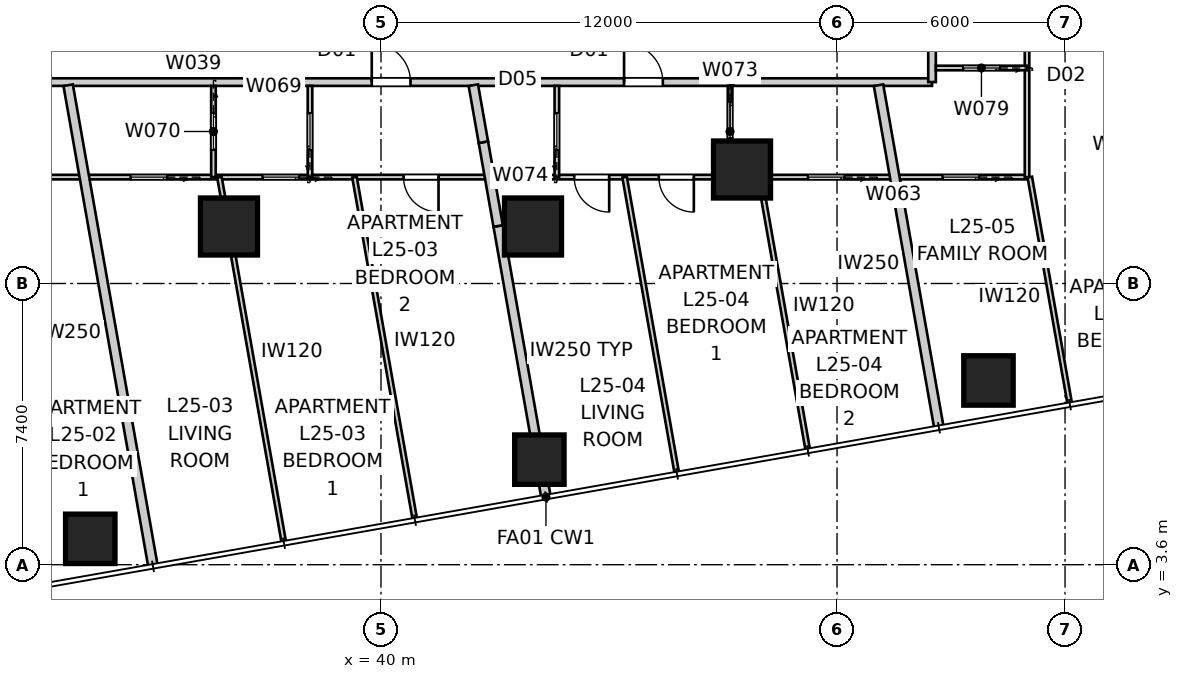
"""IFC4 building model, lengths in metres.
Left out: names, types, materials, properties, quantities, classifications, styles, units other than length and angle.
Written with IfcOpenShell. Run it as: python <this file> out.ifc"""

import sys

from ifc_helpers import new_model, si_unit, direction, frame, frame_2d, origin, origin_2d, place, context, subcontext, project, spatial, rectangle, extrude, element, fill, save


model = new_model("IFC4")
c1 = context("Model", 3, precision=1e-05, world=origin(), true_north=direction((0.0, 1.0)))
c2 = subcontext(c1, "Body", "Model", "MODEL_VIEW")
j1 = project(units=[si_unit("LENGTHUNIT", "METRE"), si_unit("PLANEANGLEUNIT", "RADIAN")], contexts=[c1])
p1 = place(None, origin())
s1 = spatial("IfcSite", under=j1, at=p1, CompositionType="ELEMENT")
p2 = place(p1, origin())
s2 = spatial("IfcBuilding", under=s1, at=p2, CompositionType="ELEMENT")
p3 = place(p2, frame((0.0, 0.0, 93.0)))
s3 = spatial("IfcBuildingStorey", under=s2, at=p3, CompositionType="ELEMENT", Elevation=93.0)
for number, where, z_axis, x_axis in (
    (1, (32.35, 4.281, 0.0), (0.0, 0.0, 1.0), (1.0, 0.0, 0.0)),
    (2, (44.167, 6.365, 0.0), (0.0, 0.0, 1.0), (1.0, 0.0, 0.0)),
    (3, (55.985, 8.448, 0.0), (0.0, 0.0, 1.0), (1.0, 0.0, 0.0)),
):
    element("IfcColumn", number, at=place(p3, frame(where, z_axis=z_axis, x_axis=x_axis)), inside=s3, PredefinedType="COLUMN", context=c2, shape_type="SweptSolid", body=[
        extrude(rectangle(XDim=1.3, YDim=1.3, at=origin_2d()), origin(), (0.0, 0.0, 1.0), 3.4),
    ])
for number, where, z_axis, x_axis in (
    (4, (36.0, 12.5, 0.0), (0.0, 0.0, 1.0), (1.0, 0.0, 0.0)),
    (5, (44.0, 12.5, 0.0), (0.0, 0.0, 1.0), (1.0, 0.0, 0.0)),
    (6, (49.5, 14.0, 0.0), (0.0, 0.0, 1.0), (1.0, 0.0, 0.0)),
):
    element("IfcColumn", number, at=place(p3, frame(where, z_axis=z_axis, x_axis=x_axis)), inside=s3, PredefinedType="COLUMN", context=c2, shape_type="SweptSolid", body=[
        extrude(rectangle(XDim=1.5, YDim=1.5, at=origin_2d()), origin(), (0.0, 0.0, 1.0), 3.4),
    ])
p4 = place(p3, frame((25.5, 16.3, 0.0), z_axis=(0.0, 0.0, 1.0), x_axis=(1.0, 0.0, 0.0)))
e7 = element("IfcWall", 7, at=p4, inside=s3, PredefinedType="PARTITIONING", context=c2, shape_type="SweptSolid", body=[
    extrude(rectangle(XDim=29.0, YDim=0.2, at=frame_2d((14.5, 0.0))), origin(), (0.0, 0.0, 1.0), 3.25),
])
p5 = place(p4, frame((20.896, 0.0, 0.0)))
e8 = element("IfcOpeningElement", 8, at=p5, cuts=e7, PredefinedType="OPENING", context=c2, shape_type="SweptSolid", body=[
    extrude(rectangle(XDim=1.02, YDim=2.34, at=frame_2d((0.51, 1.17))), frame((0.0, 0.11, 0.0), z_axis=(0.0, -1.0, 0.0), x_axis=(1.0, 0.0, 0.0)), (0.0, 0.0, 1.0), 0.22),
])
p6 = place(p4, frame((14.257, 0.0, 0.0)))
e9 = element("IfcOpeningElement", 9, at=p6, cuts=e7, PredefinedType="OPENING", context=c2, shape_type="SweptSolid", body=[
    extrude(rectangle(XDim=1.02, YDim=2.34, at=frame_2d((0.51, 1.17))), frame((0.0, 0.11, 0.0), z_axis=(0.0, -1.0, 0.0), x_axis=(1.0, 0.0, 0.0)), (0.0, 0.0, 1.0), 0.22),
])
p7 = place(p4, frame((3.857, 0.0, 0.0)))
e10 = element("IfcOpeningElement", 10, at=p7, cuts=e7, PredefinedType="OPENING", context=c2, shape_type="SweptSolid", body=[
    extrude(rectangle(XDim=1.02, YDim=2.34, at=frame_2d((0.51, 1.17))), frame((0.0, 0.11, 0.0), z_axis=(0.0, -1.0, 0.0), x_axis=(1.0, 0.0, 0.0)), (0.0, 0.0, 1.0), 0.22),
])
p8 = place(p3, frame((54.5, 16.3, 0.0), z_axis=(0.0, 0.0, 1.0), x_axis=(0.0, 1.0, 0.0)))
e11 = element("IfcWall", 11, at=p8, inside=s3, PredefinedType="PARTITIONING", context=c2, shape_type="SweptSolid", body=[
    extrude(rectangle(XDim=27.4, YDim=0.2, at=frame_2d((13.7, 0.0))), origin(), (0.0, 0.0, 1.0), 3.25),
])
p9 = place(p8, frame((19.308, 0.0, 0.0)))
e12 = element("IfcOpeningElement", 12, at=p9, cuts=e11, PredefinedType="OPENING", context=c2, shape_type="SweptSolid", body=[
    extrude(rectangle(XDim=1.02, YDim=2.34, at=frame_2d((0.51, 1.17))), frame((0.0, 0.11, 0.0), z_axis=(0.0, -1.0, 0.0), x_axis=(1.0, 0.0, 0.0)), (0.0, 0.0, 1.0), 0.22),
])
p10 = place(p8, frame((24.687, 0.0, 0.0)))
e13 = element("IfcOpeningElement", 13, at=p10, cuts=e11, PredefinedType="OPENING", context=c2, shape_type="SweptSolid", body=[
    extrude(rectangle(XDim=1.02, YDim=2.1, at=frame_2d((0.51, 1.05))), frame((0.0, 0.11, 0.0), z_axis=(0.0, -1.0, 0.0), x_axis=(1.0, 0.0, 0.0)), (0.0, 0.0, 1.0), 0.22),
])
p11 = place(p8, frame((1.622, 0.0, 0.0)))
e14 = element("IfcOpeningElement", 14, at=p11, cuts=e11, PredefinedType="OPENING", context=c2, shape_type="SweptSolid", body=[
    extrude(rectangle(XDim=1.02, YDim=2.1, at=frame_2d((0.51, 1.05))), frame((0.0, 0.11, 0.0), z_axis=(0.0, -1.0, 0.0), x_axis=(1.0, 0.0, 0.0)), (0.0, 0.0, 1.0), 0.22),
])
p12 = place(p3, frame((44.341, 5.38, 0.0), z_axis=(0.0, 0.0, 1.0), x_axis=(-0.173677660443, 0.984802553948, 0.0)))
e15 = element("IfcWall", 15, at=p12, inside=s3, PredefinedType="PARTITIONING", context=c2, shape_type="SweptSolid", body=[
    extrude(rectangle(XDim=7.244, YDim=0.25, at=frame_2d((3.622, 0.0))), origin(), (0.0, 0.0, 1.0), 3.25),
])
p13 = place(p3, frame((43.083, 12.513, 0.0), z_axis=(0.0, 0.0, 1.0), x_axis=(-0.17363609779, 0.984809882944, 0.0)))
e16 = element("IfcWall", 16, at=p13, inside=s3, PredefinedType="PARTITIONING", context=c2, shape_type="SweptSolid", body=[
    extrude(rectangle(XDim=2.24, YDim=0.25, at=frame_2d((1.12, 0.0))), origin(), (0.0, 0.0, 1.0), 2.795),
])
p14 = place(p3, frame((42.694, 14.719, 0.0), z_axis=(0.0, 0.0, 1.0), x_axis=(-0.173602272028, 0.984815846312, 0.0)))
e17 = element("IfcWall", 17, at=p14, inside=s3, PredefinedType="PARTITIONING", context=c2, shape_type="SweptSolid", body=[
    extrude(rectangle(XDim=1.522, YDim=0.25, at=frame_2d((0.761, 0.0))), origin(), (0.0, 0.0, 1.0), 3.25),
])
p15 = place(p3, frame((34.001, 3.556, 0.0), z_axis=(0.0, 0.0, 1.0), x_axis=(-0.173639088111, 0.984809355703, 0.0)))
e18 = element("IfcWall", 18, at=p15, inside=s3, PredefinedType="PARTITIONING", context=c2, shape_type="SweptSolid", body=[
    extrude(rectangle(XDim=12.857, YDim=0.25, at=frame_2d((6.428, 0.0))), origin(), (0.0, 0.0, 1.0), 3.25),
])
p16 = place(p3, frame((54.682, 7.203, 0.0), z_axis=(0.0, 0.0, 1.0), x_axis=(-0.173630137029, 0.984810933893, 0.0)))
e19 = element("IfcWall", 19, at=p16, inside=s3, PredefinedType="PARTITIONING", context=c2, shape_type="SweptSolid", body=[
    extrude(rectangle(XDim=9.154, YDim=0.25, at=frame_2d((4.577, 0.0))), origin(), (0.0, 0.0, 1.0), 3.25),
])
p17 = place(p3, frame((57.0, 13.8, 0.0), z_axis=(0.0, 0.0, 1.0), x_axis=(-1.0, 0.0, 0.0)))
e20 = element("IfcWall", 20, at=p17, inside=s3, PredefinedType="PARTITIONING", context=c2, shape_type="SweptSolid", body=[
    extrude(rectangle(XDim=34.0, YDim=0.12, at=frame_2d((17.0, 0.0))), origin(), (0.0, 0.0, 1.0), 2.55),
])
p18 = place(p17, frame((8.768, 0.0, 0.0)))
e21 = element("IfcOpeningElement", 21, at=p18, cuts=e20, PredefinedType="OPENING", context=c2, shape_type="SweptSolid", body=[
    extrude(rectangle(XDim=0.92, YDim=2.34, at=frame_2d((0.46, 1.17))), frame((0.0, 0.07, 0.0), z_axis=(0.0, -1.0, 0.0), x_axis=(1.0, 0.0, 0.0)), (0.0, 0.0, 1.0), 0.14),
])
p19 = place(p17, frame((10.995, 0.0, 0.0)))
e22 = element("IfcOpeningElement", 22, at=p19, cuts=e20, PredefinedType="OPENING", context=c2, shape_type="SweptSolid", body=[
    extrude(rectangle(XDim=0.92, YDim=2.34, at=frame_2d((0.46, 1.17))), frame((0.0, 0.07, 0.0), z_axis=(0.0, -1.0, 0.0), x_axis=(1.0, 0.0, 0.0)), (0.0, 0.0, 1.0), 0.14),
])
p20 = place(p17, frame((15.486, 0.0, 0.0)))
e23 = element("IfcOpeningElement", 23, at=p20, cuts=e20, PredefinedType="OPENING", context=c2, shape_type="SweptSolid", body=[
    extrude(rectangle(XDim=0.92, YDim=2.34, at=frame_2d((0.46, 1.17))), frame((0.0, 0.07, 0.0), z_axis=(0.0, -1.0, 0.0), x_axis=(1.0, 0.0, 0.0)), (0.0, 0.0, 1.0), 0.14),
])
p21 = place(p17, frame((4.804, 0.0, 0.0)))
e24 = element("IfcOpeningElement", 24, at=p21, cuts=e20, PredefinedType="OPENING", context=c2, shape_type="SweptSolid", body=[
    extrude(rectangle(XDim=0.96, YDim=2.1, at=frame_2d((0.48, 1.05))), frame((0.0, 0.07, 0.0), z_axis=(0.0, -1.0, 0.0), x_axis=(1.0, 0.0, 0.0)), (0.0, 0.0, 1.0), 0.14),
])
p22 = place(p17, frame((19.155, 0.0, 0.0)))
e25 = element("IfcOpeningElement", 25, at=p22, cuts=e20, PredefinedType="OPENING", context=c2, shape_type="SweptSolid", body=[
    extrude(rectangle(XDim=0.96, YDim=2.1, at=frame_2d((0.48, 1.05))), frame((0.0, 0.07, 0.0), z_axis=(0.0, -1.0, 0.0), x_axis=(1.0, 0.0, 0.0)), (0.0, 0.0, 1.0), 0.14),
])
p23 = place(p17, frame((31.473, 0.0, 0.0)))
e26 = element("IfcOpeningElement", 26, at=p23, cuts=e20, PredefinedType="OPENING", context=c2, shape_type="SweptSolid", body=[
    extrude(rectangle(XDim=0.96, YDim=2.1, at=frame_2d((0.48, 1.05))), frame((0.0, 0.07, 0.0), z_axis=(0.0, -1.0, 0.0), x_axis=(1.0, 0.0, 0.0)), (0.0, 0.0, 1.0), 0.14),
])
p24 = place(p17, frame((1.261, 0.0, 0.0)))
e27 = element("IfcOpeningElement", 27, at=p24, cuts=e20, PredefinedType="OPENING", context=c2, shape_type="SweptSolid", body=[
    extrude(rectangle(XDim=0.96, YDim=2.1, at=frame_2d((0.48, 1.05))), frame((0.0, 0.07, 0.0), z_axis=(0.0, -1.0, 0.0), x_axis=(1.0, 0.0, 0.0)), (0.0, 0.0, 1.0), 0.14),
])
p25 = place(p17, frame((22.627, 0.0, 0.0)))
e28 = element("IfcOpeningElement", 28, at=p25, cuts=e20, PredefinedType="OPENING", context=c2, shape_type="SweptSolid", body=[
    extrude(rectangle(XDim=0.96, YDim=2.1, at=frame_2d((0.48, 1.05))), frame((0.0, 0.07, 0.0), z_axis=(0.0, -1.0, 0.0), x_axis=(1.0, 0.0, 0.0)), (0.0, 0.0, 1.0), 0.14),
])
p26 = place(p3, frame((38.132, 13.8, 0.0), z_axis=(0.0, 0.0, 1.0), x_axis=(0.0, 1.0, 0.0)))
e29 = element("IfcWall", 29, at=p26, inside=s3, PredefinedType="PARTITIONING", context=c2, shape_type="SweptSolid", body=[
    extrude(rectangle(XDim=2.4, YDim=0.12, at=frame_2d((1.2, 0.0))), origin(), (0.0, 0.0, 1.0), 3.25),
])
p27 = place(p26, frame((0.72, 0.0, 0.0)))
e30 = element("IfcOpeningElement", 30, at=p27, cuts=e29, PredefinedType="OPENING", context=c2, shape_type="SweptSolid", body=[
    extrude(rectangle(XDim=0.96, YDim=2.1, at=frame_2d((0.48, 1.05))), frame((0.0, 0.07, 0.0), z_axis=(0.0, -1.0, 0.0), x_axis=(1.0, 0.0, 0.0)), (0.0, 0.0, 1.0), 0.14),
])
p28 = place(p3, frame((35.591, 16.2, 0.0), z_axis=(0.0, 0.0, 1.0), x_axis=(0.0, -1.0, 0.0)))
e31 = element("IfcWall", 31, at=p28, inside=s3, PredefinedType="PARTITIONING", context=c2, shape_type="SweptSolid", body=[
    extrude(rectangle(XDim=2.4, YDim=0.12, at=frame_2d((1.2, 0.0))), origin(), (0.0, 0.0, 1.0), 3.25),
])
p29 = place(p28, frame((0.72, 0.0, 0.0)))
e32 = element("IfcOpeningElement", 32, at=p29, cuts=e31, PredefinedType="OPENING", context=c2, shape_type="SweptSolid", body=[
    extrude(rectangle(XDim=0.96, YDim=2.1, at=frame_2d((0.48, 1.05))), frame((0.0, 0.07, 0.0), z_axis=(0.0, -1.0, 0.0), x_axis=(1.0, 0.0, 0.0)), (0.0, 0.0, 1.0), 0.14),
])
p30 = place(p3, frame((35.749, 13.8, 0.0), z_axis=(0.0, 0.0, 1.0), x_axis=(0.173650980998, -0.984807258705, 0.0)))
e33 = element("IfcWall", 33, at=p30, inside=s3, PredefinedType="PARTITIONING", context=c2, shape_type="SweptSolid", body=[
    extrude(rectangle(XDim=9.744, YDim=0.12, at=frame_2d((4.872, 0.0))), origin(), (0.0, 0.0, 1.0), 3.25),
])
p31 = place(p3, frame((39.302, 13.8, 0.0), z_axis=(0.0, 0.0, 1.0), x_axis=(0.173652576186, -0.984806977424, 0.0)))
e34 = element("IfcWall", 34, at=p31, inside=s3, PredefinedType="PARTITIONING", context=c2, shape_type="SweptSolid", body=[
    extrude(rectangle(XDim=9.127, YDim=0.12, at=frame_2d((4.563, 0.0))), origin(), (0.0, 0.0, 1.0), 3.25),
])
p32 = place(p3, frame((49.185, 16.2, 0.0), z_axis=(0.0, 0.0, 1.0), x_axis=(0.0, -1.0, 0.0)))
e35 = element("IfcWall", 35, at=p32, inside=s3, PredefinedType="PARTITIONING", context=c2, shape_type="SweptSolid", body=[
    extrude(rectangle(XDim=2.4, YDim=0.12, at=frame_2d((1.2, 0.0))), origin(), (0.0, 0.0, 1.0), 3.25),
])
p33 = place(p32, frame((0.42, 0.0, 0.0)))
e36 = element("IfcOpeningElement", 36, at=p33, cuts=e35, PredefinedType="OPENING", context=c2, shape_type="SweptSolid", body=[
    extrude(rectangle(XDim=0.96, YDim=2.1, at=frame_2d((0.48, 1.05))), frame((0.0, 0.07, 0.0), z_axis=(0.0, -1.0, 0.0), x_axis=(1.0, 0.0, 0.0)), (0.0, 0.0, 1.0), 0.14),
])
p34 = place(p3, frame((44.628, 13.8, 0.0), z_axis=(0.0, 0.0, 1.0), x_axis=(0.0, 1.0, 0.0)))
e37 = element("IfcWall", 37, at=p34, inside=s3, PredefinedType="PARTITIONING", context=c2, shape_type="SweptSolid", body=[
    extrude(rectangle(XDim=2.4, YDim=0.12, at=frame_2d((1.2, 0.0))), origin(), (0.0, 0.0, 1.0), 3.25),
])
p35 = place(p34, frame((0.72, 0.0, 0.0)))
e38 = element("IfcOpeningElement", 38, at=p35, cuts=e37, PredefinedType="OPENING", context=c2, shape_type="SweptSolid", body=[
    extrude(rectangle(XDim=0.96, YDim=2.1, at=frame_2d((0.48, 1.05))), frame((0.0, 0.07, 0.0), z_axis=(0.0, -1.0, 0.0), x_axis=(1.0, 0.0, 0.0)), (0.0, 0.0, 1.0), 0.14),
])
p36 = place(p3, frame((46.41, 13.8, 0.0), z_axis=(0.0, 0.0, 1.0), x_axis=(0.173645935638, -0.98480814834, 0.0)))
e39 = element("IfcWall", 39, at=p36, inside=s3, PredefinedType="PARTITIONING", context=c2, shape_type="SweptSolid", body=[
    extrude(rectangle(XDim=7.893, YDim=0.12, at=frame_2d((3.947, 0.0))), origin(), (0.0, 0.0, 1.0), 3.25),
])
p37 = place(p3, frame((49.964, 13.8, 0.0), z_axis=(0.0, 0.0, 1.0), x_axis=(0.173647508681, -0.984807870972, 0.0)))
e40 = element("IfcWall", 40, at=p37, inside=s3, PredefinedType="PARTITIONING", context=c2, shape_type="SweptSolid", body=[
    extrude(rectangle(XDim=7.276, YDim=0.12, at=frame_2d((3.638, 0.0))), origin(), (0.0, 0.0, 1.0), 3.25),
])
p38 = place(p3, frame((57.0, 46.2, 0.0), z_axis=(0.0, 0.0, 1.0), x_axis=(0.0, -1.0, 0.0)))
e41 = element("IfcWall", 41, at=p38, inside=s3, PredefinedType="PARTITIONING", context=c2, shape_type="SweptSolid", body=[
    extrude(rectangle(XDim=32.4, YDim=0.12, at=frame_2d((16.2, 0.0))), origin(), (0.0, 0.0, 1.0), 2.55),
])
p39 = place(p38, frame((10.396, 0.0, 0.0)))
e42 = element("IfcOpeningElement", 42, at=p39, cuts=e41, PredefinedType="OPENING", context=c2, shape_type="SweptSolid", body=[
    extrude(rectangle(XDim=0.92, YDim=2.34, at=frame_2d((0.46, 1.17))), frame((0.0, 0.07, 0.0), z_axis=(0.0, -1.0, 0.0), x_axis=(1.0, 0.0, 0.0)), (0.0, 0.0, 1.0), 0.14),
])
p40 = place(p38, frame((7.587, 0.0, 0.0)))
e43 = element("IfcOpeningElement", 43, at=p40, cuts=e41, PredefinedType="OPENING", context=c2, shape_type="SweptSolid", body=[
    extrude(rectangle(XDim=0.92, YDim=2.34, at=frame_2d((0.46, 1.17))), frame((0.0, 0.07, 0.0), z_axis=(0.0, -1.0, 0.0), x_axis=(1.0, 0.0, 0.0)), (0.0, 0.0, 1.0), 0.14),
])
p41 = place(p38, frame((3.843, 0.0, 0.0)))
e44 = element("IfcOpeningElement", 44, at=p41, cuts=e41, PredefinedType="OPENING", context=c2, shape_type="SweptSolid", body=[
    extrude(rectangle(XDim=0.92, YDim=2.34, at=frame_2d((0.46, 1.17))), frame((0.0, 0.07, 0.0), z_axis=(0.0, -1.0, 0.0), x_axis=(1.0, 0.0, 0.0)), (0.0, 0.0, 1.0), 0.14),
])
p42 = place(p38, frame((27.988, 0.0, 0.0)))
e45 = element("IfcOpeningElement", 45, at=p42, cuts=e41, PredefinedType="OPENING", context=c2, shape_type="SweptSolid", body=[
    extrude(rectangle(XDim=0.92, YDim=2.34, at=frame_2d((0.46, 1.17))), frame((0.0, 0.07, 0.0), z_axis=(0.0, -1.0, 0.0), x_axis=(1.0, 0.0, 0.0)), (0.0, 0.0, 1.0), 0.14),
])
p43 = place(p38, frame((23.957, 0.0, 0.0)))
e46 = element("IfcOpeningElement", 46, at=p43, cuts=e41, PredefinedType="OPENING", context=c2, shape_type="SweptSolid", body=[
    extrude(rectangle(XDim=0.96, YDim=2.1, at=frame_2d((0.48, 1.05))), frame((0.0, 0.07, 0.0), z_axis=(0.0, -1.0, 0.0), x_axis=(1.0, 0.0, 0.0)), (0.0, 0.0, 1.0), 0.14),
])
p44 = place(p38, frame((21.108, 0.0, 0.0)))
e47 = element("IfcOpeningElement", 47, at=p44, cuts=e41, PredefinedType="OPENING", context=c2, shape_type="SweptSolid", body=[
    extrude(rectangle(XDim=0.96, YDim=2.1, at=frame_2d((0.48, 1.05))), frame((0.0, 0.07, 0.0), z_axis=(0.0, -1.0, 0.0), x_axis=(1.0, 0.0, 0.0)), (0.0, 0.0, 1.0), 0.14),
])
p45 = place(p3, frame((57.0, 16.671, 0.0), z_axis=(0.0, 0.0, 1.0), x_axis=(-1.0, 0.0, 0.0)))
e48 = element("IfcWall", 48, at=p45, inside=s3, PredefinedType="PARTITIONING", context=c2, shape_type="SweptSolid", body=[
    extrude(rectangle(XDim=2.4, YDim=0.12, at=frame_2d((1.2, 0.0))), origin(), (0.0, 0.0, 1.0), 3.25),
])
p46 = place(p45, frame((0.72, 0.0, 0.0)))
e49 = element("IfcOpeningElement", 49, at=p46, cuts=e48, PredefinedType="OPENING", context=c2, shape_type="SweptSolid", body=[
    extrude(rectangle(XDim=0.96, YDim=2.1, at=frame_2d((0.48, 1.05))), frame((0.0, 0.07, 0.0), z_axis=(0.0, -1.0, 0.0), x_axis=(1.0, 0.0, 0.0)), (0.0, 0.0, 1.0), 0.14),
])
p47 = place(p3, frame((58.122, 7.85, 0.0), z_axis=(0.0, 0.0, 1.0), x_axis=(-0.173644708382, 0.984808364734, 0.0)))
e50 = element("IfcWall", 50, at=p47, inside=s3, PredefinedType="PARTITIONING", context=c2, shape_type="SweptSolid", body=[
    extrude(rectangle(XDim=6.042, YDim=0.12, at=frame_2d((3.021, 0.0))), origin(), (0.0, 0.0, 1.0), 2.638),
])
p48 = place(p5, origin())
e51 = element("IfcDoor", 51, at=p48, inside=s3, OperationType="SINGLE_SWING_LEFT", PredefinedType="DOOR", context=c2, shape_type="SweptSolid", body=[
    extrude(rectangle(XDim=1.02, YDim=2.34, at=frame_2d((0.51, 1.17))), frame((0.0, 0.025, 0.0), z_axis=(0.0, -1.0, 0.0), x_axis=(1.0, 0.0, 0.0)), (0.0, 0.0, 1.0), 0.05),
])
fill(e8, e51)
p49 = place(p6, origin())
e52 = element("IfcDoor", 52, at=p49, inside=s3, OperationType="SINGLE_SWING_LEFT", PredefinedType="DOOR", context=c2, shape_type="SweptSolid", body=[
    extrude(rectangle(XDim=1.02, YDim=2.34, at=frame_2d((0.51, 1.17))), frame((0.0, 0.025, 0.0), z_axis=(0.0, -1.0, 0.0), x_axis=(1.0, 0.0, 0.0)), (0.0, 0.0, 1.0), 0.05),
])
fill(e9, e52)
p50 = place(p18, origin())
e53 = element("IfcDoor", 53, at=p50, inside=s3, OperationType="SINGLE_SWING_LEFT", PredefinedType="DOOR", context=c2, shape_type="SweptSolid", body=[
    extrude(rectangle(XDim=0.92, YDim=2.34, at=frame_2d((0.46, 1.17))), frame((0.0, 0.025, 0.0), z_axis=(0.0, -1.0, 0.0), x_axis=(1.0, 0.0, 0.0)), (0.0, 0.0, 1.0), 0.05),
])
fill(e21, e53)
p51 = place(p33, origin())
e54 = element("IfcDoor", 54, at=p51, inside=s3, OperationType="SLIDING_TO_LEFT", PredefinedType="DOOR", context=c2, shape_type="SweptSolid", body=[
    extrude(rectangle(XDim=0.96, YDim=2.1, at=frame_2d((0.48, 1.05))), frame((0.0, 0.025, 0.0), z_axis=(0.0, -1.0, 0.0), x_axis=(1.0, 0.0, 0.0)), (0.0, 0.0, 1.0), 0.05),
])
fill(e36, e54)
p52 = place(p35, origin())
e55 = element("IfcDoor", 55, at=p52, inside=s3, OperationType="SLIDING_TO_LEFT", PredefinedType="DOOR", context=c2, shape_type="SweptSolid", body=[
    extrude(rectangle(XDim=0.96, YDim=2.1, at=frame_2d((0.48, 1.05))), frame((0.0, 0.025, 0.0), z_axis=(0.0, -1.0, 0.0), x_axis=(1.0, 0.0, 0.0)), (0.0, 0.0, 1.0), 0.05),
])
fill(e38, e55)
p53 = place(p19, origin())
e56 = element("IfcDoor", 56, at=p53, inside=s3, OperationType="SINGLE_SWING_LEFT", PredefinedType="DOOR", context=c2, shape_type="SweptSolid", body=[
    extrude(rectangle(XDim=0.92, YDim=2.34, at=frame_2d((0.46, 1.17))), frame((0.0, 0.025, 0.0), z_axis=(0.0, -1.0, 0.0), x_axis=(1.0, 0.0, 0.0)), (0.0, 0.0, 1.0), 0.05),
])
fill(e22, e56)
p54 = place(p20, origin())
e57 = element("IfcDoor", 57, at=p54, inside=s3, OperationType="SINGLE_SWING_LEFT", PredefinedType="DOOR", context=c2, shape_type="SweptSolid", body=[
    extrude(rectangle(XDim=0.92, YDim=2.34, at=frame_2d((0.46, 1.17))), frame((0.0, 0.025, 0.0), z_axis=(0.0, -1.0, 0.0), x_axis=(1.0, 0.0, 0.0)), (0.0, 0.0, 1.0), 0.05),
])
fill(e23, e57)
p55 = place(p27, origin())
e58 = element("IfcDoor", 58, at=p55, inside=s3, OperationType="SLIDING_TO_LEFT", PredefinedType="DOOR", context=c2, shape_type="SweptSolid", body=[
    extrude(rectangle(XDim=0.96, YDim=2.1, at=frame_2d((0.48, 1.05))), frame((0.0, 0.025, 0.0), z_axis=(0.0, -1.0, 0.0), x_axis=(1.0, 0.0, 0.0)), (0.0, 0.0, 1.0), 0.05),
])
fill(e30, e58)
p56 = place(p46, origin())
e59 = element("IfcDoor", 59, at=p56, inside=s3, OperationType="SLIDING_TO_LEFT", PredefinedType="DOOR", context=c2, shape_type="SweptSolid", body=[
    extrude(rectangle(XDim=0.96, YDim=2.1, at=frame_2d((0.48, 1.05))), frame((0.0, 0.025, 0.0), z_axis=(0.0, -1.0, 0.0), x_axis=(1.0, 0.0, 0.0)), (0.0, 0.0, 1.0), 0.05),
])
fill(e49, e59)
p57 = place(p21, origin())
e60 = element("IfcDoor", 60, at=p57, inside=s3, OperationType="SLIDING_TO_LEFT", PredefinedType="DOOR", context=c2, shape_type="SweptSolid", body=[
    extrude(rectangle(XDim=0.96, YDim=2.1, at=frame_2d((0.48, 1.05))), frame((0.0, 0.025, 0.0), z_axis=(0.0, -1.0, 0.0), x_axis=(1.0, 0.0, 0.0)), (0.0, 0.0, 1.0), 0.05),
])
fill(e24, e60)
p58 = place(p22, origin())
e61 = element("IfcDoor", 61, at=p58, inside=s3, OperationType="SLIDING_TO_LEFT", PredefinedType="DOOR", context=c2, shape_type="SweptSolid", body=[
    extrude(rectangle(XDim=0.96, YDim=2.1, at=frame_2d((0.48, 1.05))), frame((0.0, 0.025, 0.0), z_axis=(0.0, -1.0, 0.0), x_axis=(1.0, 0.0, 0.0)), (0.0, 0.0, 1.0), 0.05),
])
fill(e25, e61)
p59 = place(p29, origin())
e62 = element("IfcDoor", 62, at=p59, inside=s3, OperationType="SLIDING_TO_LEFT", PredefinedType="DOOR", context=c2, shape_type="SweptSolid", body=[
    extrude(rectangle(XDim=0.96, YDim=2.1, at=frame_2d((0.48, 1.05))), frame((0.0, 0.025, 0.0), z_axis=(0.0, -1.0, 0.0), x_axis=(1.0, 0.0, 0.0)), (0.0, 0.0, 1.0), 0.05),
])
fill(e32, e62)
p60 = place(p24, origin())
e63 = element("IfcDoor", 63, at=p60, inside=s3, OperationType="SLIDING_TO_LEFT", PredefinedType="DOOR", context=c2, shape_type="SweptSolid", body=[
    extrude(rectangle(XDim=0.96, YDim=2.1, at=frame_2d((0.48, 1.05))), frame((0.0, 0.025, 0.0), z_axis=(0.0, -1.0, 0.0), x_axis=(1.0, 0.0, 0.0)), (0.0, 0.0, 1.0), 0.05),
])
fill(e27, e63)
p61 = place(p25, origin())
e64 = element("IfcDoor", 64, at=p61, inside=s3, OperationType="SLIDING_TO_LEFT", PredefinedType="DOOR", context=c2, shape_type="SweptSolid", body=[
    extrude(rectangle(XDim=0.96, YDim=2.1, at=frame_2d((0.48, 1.05))), frame((0.0, 0.025, 0.0), z_axis=(0.0, -1.0, 0.0), x_axis=(1.0, 0.0, 0.0)), (0.0, 0.0, 1.0), 0.05),
])
fill(e28, e64)
save(model, sys.argv[1])
